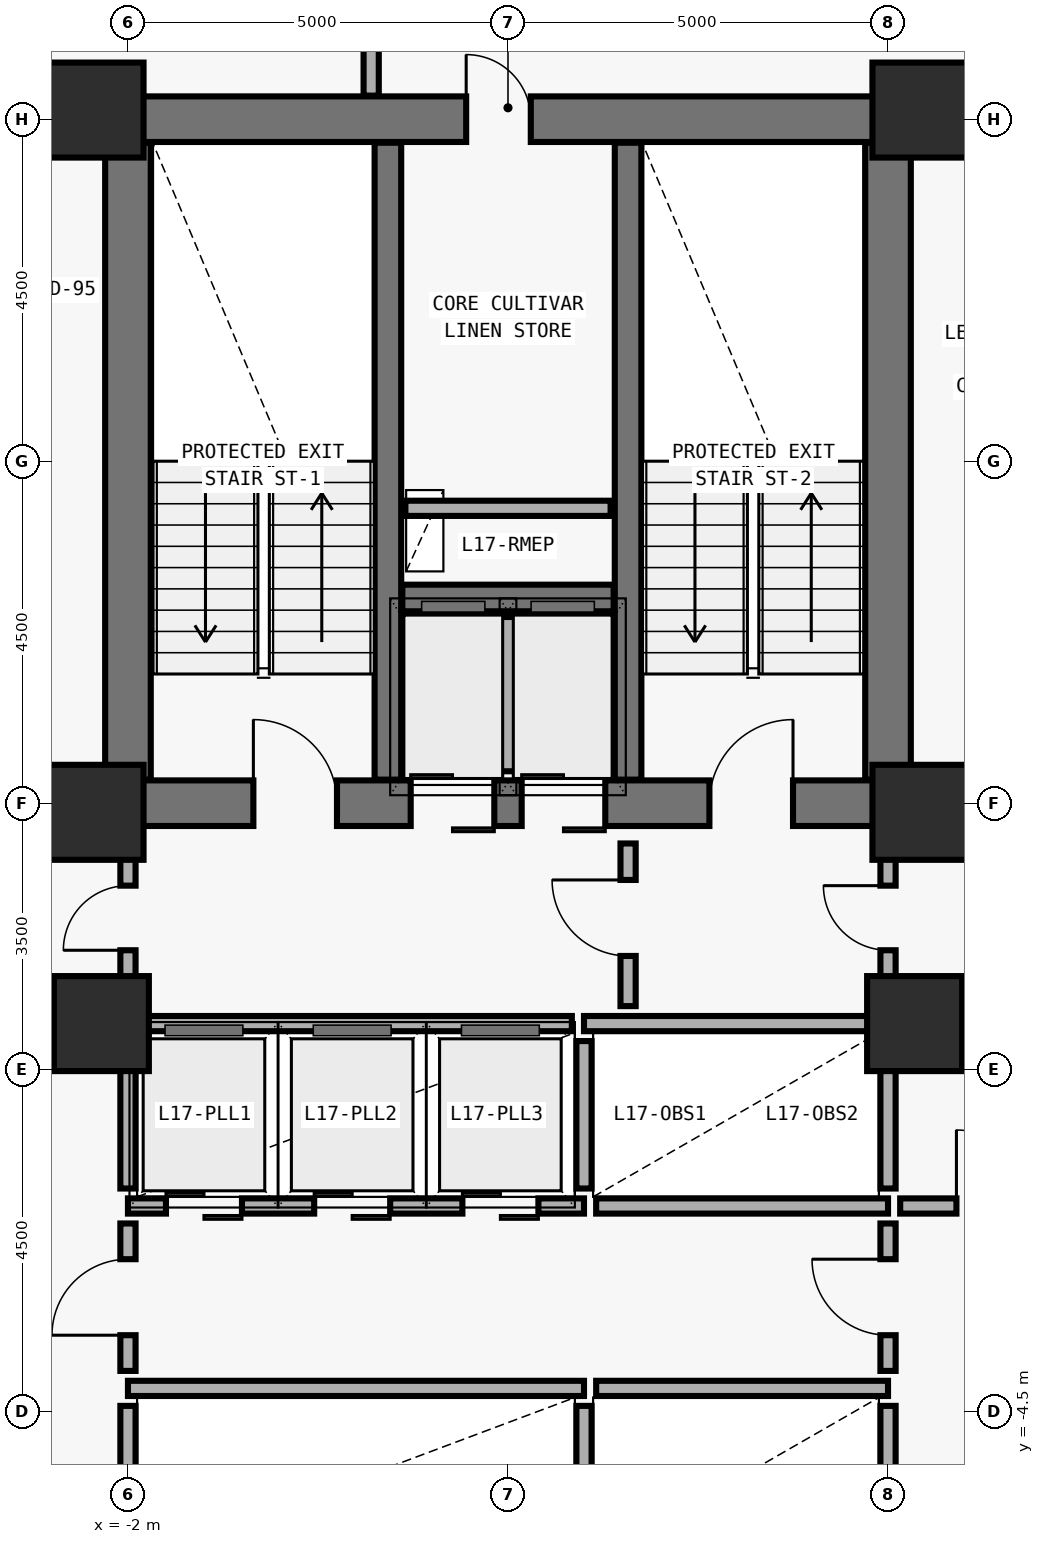
"""IFC4 building model, lengths in metres.
Left out: names, types, materials, properties, quantities, classifications, styles, units other than length and angle.
Written with IfcOpenShell. Run it as: python <this file> out.ifc"""

import sys

from ifc_helpers import new_model, si_unit, direction, frame, frame_2d, origin, origin_2d, place, context, subcontext, project, spatial, rectangle, extrude, element, fill, save


model = new_model("IFC4")
c1 = context("Model", 3, precision=1e-05, world=origin(), true_north=direction((0.0, 1.0)))
c2 = subcontext(c1, "Body", "Model", "MODEL_VIEW")
j1 = project(units=[si_unit("LENGTHUNIT", "METRE"), si_unit("PLANEANGLEUNIT", "RADIAN")], contexts=[c1])
p1 = place(None, origin())
s1 = spatial("IfcSite", under=j1, at=p1, CompositionType="ELEMENT")
p2 = place(p1, origin())
s2 = spatial("IfcBuilding", under=s1, at=p2, CompositionType="ELEMENT")
p3 = place(p2, frame((0.0, 0.0, 70.5)))
s3 = spatial("IfcBuildingStorey", under=s2, at=p3, CompositionType="ELEMENT", Elevation=70.5)
p4 = place(p3, frame((-2.0, 3.5, 0.0), z_axis=(0.0, 0.0, 1.0), x_axis=(1.0, 0.0, 0.0)))
e1 = element("IfcWall", 1, at=p4, inside=s3, PredefinedType="SHEAR", context=c2, shape_type="SweptSolid", body=[
    extrude(rectangle(XDim=10.0, YDim=0.6, at=frame_2d((5.0, 0.0))), origin(), (0.0, 0.0, 1.0), 3.892),
])
p5 = place(p4, frame((1.65, 0.0, 0.0)))
e2 = element("IfcOpeningElement", 2, at=p5, cuts=e1, PredefinedType="OPENING", context=c2, shape_type="SweptSolid", body=[
    extrude(rectangle(XDim=1.1, YDim=2.15, at=frame_2d((0.55, 1.075))), frame((0.0, 0.31, 0.0), z_axis=(0.0, -1.0, 0.0), x_axis=(1.0, 0.0, 0.0)), (0.0, 0.0, 1.0), 0.62),
])
p6 = place(p4, frame((7.65, 0.0, 0.0)))
e3 = element("IfcOpeningElement", 3, at=p6, cuts=e1, PredefinedType="OPENING", context=c2, shape_type="SweptSolid", body=[
    extrude(rectangle(XDim=1.1, YDim=2.15, at=frame_2d((0.55, 1.075))), frame((0.0, 0.31, 0.0), z_axis=(0.0, -1.0, 0.0), x_axis=(1.0, 0.0, 0.0)), (0.0, 0.0, 1.0), 0.62),
])
p7 = place(p4, frame((3.72, 0.0, 0.0)))
e4 = element("IfcOpeningElement", 4, at=p7, cuts=e1, PredefinedType="OPENING", context=c2, shape_type="SweptSolid", body=[
    extrude(rectangle(XDim=1.1, YDim=2.2, at=frame_2d((0.55, 1.1))), frame((0.0, 0.31, 0.0), z_axis=(0.0, -1.0, 0.0), x_axis=(1.0, 0.0, 0.0)), (0.0, 0.0, 1.0), 0.62),
])
p8 = place(p4, frame((5.18, 0.0, 0.0)))
e5 = element("IfcOpeningElement", 5, at=p8, cuts=e1, PredefinedType="OPENING", context=c2, shape_type="SweptSolid", body=[
    extrude(rectangle(XDim=1.1, YDim=2.2, at=frame_2d((0.55, 1.1))), frame((0.0, 0.31, 0.0), z_axis=(0.0, -1.0, 0.0), x_axis=(1.0, 0.0, 0.0)), (0.0, 0.0, 1.0), 0.62),
])
p9 = place(p3, frame((-2.0, 12.5, 0.0), z_axis=(0.0, 0.0, 1.0), x_axis=(1.0, 0.0, 0.0)))
e6 = element("IfcWall", 6, at=p9, inside=s3, PredefinedType="SHEAR", context=c2, shape_type="SweptSolid", body=[
    extrude(rectangle(XDim=10.0, YDim=0.6, at=frame_2d((5.0, 0.0))), origin(), (0.0, 0.0, 1.0), 3.892),
])
p10 = place(p9, frame((4.45, 0.0, 0.0)))
e7 = element("IfcOpeningElement", 7, at=p10, cuts=e6, PredefinedType="OPENING", context=c2, shape_type="SweptSolid", body=[
    extrude(rectangle(XDim=0.85, YDim=2.1, at=frame_2d((0.425, 1.05))), frame((0.0, 0.31, 0.0), z_axis=(0.0, -1.0, 0.0), x_axis=(1.0, 0.0, 0.0)), (0.0, 0.0, 1.0), 0.62),
])
for number, where, z_axis, x_axis in (
    (8, (-2.0, 3.81, 0.0), (0.0, 0.0, 1.0), (0.0, 1.0, 0.0)),
    (9, (8.0, 3.81, 0.0), (0.0, 0.0, 1.0), (0.0, 1.0, 0.0)),
):
    element("IfcWall", number, at=place(p3, frame(where, z_axis=z_axis, x_axis=x_axis)), inside=s3, PredefinedType="SHEAR", context=c2, shape_type="SweptSolid", body=[
        extrude(rectangle(XDim=8.38, YDim=0.6, at=frame_2d((4.19, 0.0))), origin(), (0.0, 0.0, 1.0), 3.892),
    ])
for number, where, z_axis, x_axis in (
    (10, (1.42, 3.81, 0.0), (0.0, 0.0, 1.0), (0.0, 1.0, 0.0)),
    (11, (4.58, 3.81, 0.0), (0.0, 0.0, 1.0), (0.0, 1.0, 0.0)),
):
    element("IfcWall", number, at=place(p3, frame(where, z_axis=z_axis, x_axis=x_axis)), inside=s3, PredefinedType="SHEAR", context=c2, shape_type="SweptSolid", body=[
        extrude(rectangle(XDim=8.38, YDim=0.35, at=frame_2d((4.19, 0.0))), origin(), (0.0, 0.0, 1.0), 3.892),
    ])
p11 = place(p3, frame((1.61, 6.2, 0.0), z_axis=(0.0, 0.0, 1.0), x_axis=(1.0, 0.0, 0.0)))
e12 = element("IfcWall", 12, at=p11, inside=s3, PredefinedType="SHEAR", context=c2, shape_type="SweptSolid", body=[
    extrude(rectangle(XDim=2.78, YDim=0.35, at=frame_2d((1.39, 0.0))), origin(), (0.0, 0.0, 1.0), 3.892),
])
for number, where, z_axis, x_axis in (
    (13, (-2.42, 12.62, 0.0), (0.0, 0.0, 1.0), (1.0, 0.0, 0.0)),
    (14, (8.42, 12.62, 0.0), (0.0, 0.0, 1.0), (1.0, 0.0, 0.0)),
    (15, (-2.42, 3.38, 0.0), (0.0, 0.0, 1.0), (1.0, 0.0, 0.0)),
    (16, (8.42, 3.38, 0.0), (0.0, 0.0, 1.0), (1.0, 0.0, 0.0)),
    (17, (-2.35, 0.6, 0.0), (0.0, 0.0, 1.0), (1.0, 0.0, 0.0)),
    (18, (8.35, 0.6, 0.0), (0.0, 0.0, 1.0), (1.0, 0.0, 0.0)),
):
    element("IfcColumn", number, at=place(p3, frame(where, z_axis=z_axis, x_axis=x_axis)), inside=s3, PredefinedType="COLUMN", context=c2, shape_type="SweptSolid", body=[
        extrude(rectangle(XDim=1.25, YDim=1.25, at=origin_2d()), origin(), (0.0, 0.0, 1.0), 3.875),
    ])
p12 = place(p3, frame((3.0, 3.92, 0.0), z_axis=(0.0, 0.0, 1.0), x_axis=(0.0, 1.0, 0.0)))
e19 = element("IfcWall", 19, at=p12, inside=s3, PredefinedType="SOLIDWALL", context=c2, shape_type="SweptSolid", body=[
    extrude(rectangle(XDim=2.03, YDim=0.2, at=frame_2d((1.015, 0.0))), origin(), (0.0, 0.0, 1.0), 3.64),
])
p13 = place(p3, frame((1.65, 7.38, 0.0), z_axis=(0.0, 0.0, 1.0), x_axis=(1.0, 0.0, 0.0)))
e20 = element("IfcWall", 20, at=p13, inside=s3, PredefinedType="SOLIDWALL", context=c2, shape_type="SweptSolid", body=[
    extrude(rectangle(XDim=2.7, YDim=0.2, at=frame_2d((1.35, 0.0))), origin(), (0.0, 0.0, 1.0), 3.64),
])
p14 = place(p3, frame((4.0, 0.6, 0.0), z_axis=(0.0, 0.0, 1.0), x_axis=(1.0, 0.0, 0.0)))
e21 = element("IfcWall", 21, at=p14, inside=s3, PredefinedType="SOLIDWALL", context=c2, shape_type="SweptSolid", body=[
    extrude(rectangle(XDim=3.88, YDim=0.2, at=frame_2d((1.94, 0.0))), origin(), (0.0, 0.0, 1.0), 3.122),
])
p15 = place(p3, frame((-2.0, -1.8, 0.0), z_axis=(0.0, 0.0, 1.0), x_axis=(1.0, 0.0, 0.0)))
e22 = element("IfcWall", 22, at=p15, inside=s3, PredefinedType="SOLIDWALL", context=c2, shape_type="SweptSolid", body=[
    extrude(rectangle(XDim=6.0, YDim=0.2, at=frame_2d((3.0, 0.0))), origin(), (0.0, 0.0, 1.0), 3.64),
])
p16 = place(p15, frame((0.5, 0.0, 0.0)))
e23 = element("IfcOpeningElement", 23, at=p16, cuts=e22, PredefinedType="OPENING", context=c2, shape_type="SweptSolid", body=[
    extrude(rectangle(XDim=1.0, YDim=2.2, at=frame_2d((0.5, 1.1))), frame((0.0, 0.11, 0.0), z_axis=(0.0, -1.0, 0.0), x_axis=(1.0, 0.0, 0.0)), (0.0, 0.0, 1.0), 0.22),
])
p17 = place(p15, frame((2.45, 0.0, 0.0)))
e24 = element("IfcOpeningElement", 24, at=p17, cuts=e22, PredefinedType="OPENING", context=c2, shape_type="SweptSolid", body=[
    extrude(rectangle(XDim=1.0, YDim=2.2, at=frame_2d((0.5, 1.1))), frame((0.0, 0.11, 0.0), z_axis=(0.0, -1.0, 0.0), x_axis=(1.0, 0.0, 0.0)), (0.0, 0.0, 1.0), 0.22),
])
p18 = place(p15, frame((4.4, 0.0, 0.0)))
e25 = element("IfcOpeningElement", 25, at=p18, cuts=e22, PredefinedType="OPENING", context=c2, shape_type="SweptSolid", body=[
    extrude(rectangle(XDim=1.0, YDim=2.2, at=frame_2d((0.5, 1.1))), frame((0.0, 0.11, 0.0), z_axis=(0.0, -1.0, 0.0), x_axis=(1.0, 0.0, 0.0)), (0.0, 0.0, 1.0), 0.22),
])
p19 = place(p3, frame((-2.0, -1.57, 0.0), z_axis=(0.0, 0.0, 1.0), x_axis=(0.0, 1.0, 0.0)))
e26 = element("IfcWall", 26, at=p19, inside=s3, PredefinedType="SOLIDWALL", context=c2, shape_type="SweptSolid", body=[
    extrude(rectangle(XDim=2.05, YDim=0.2, at=frame_2d((1.025, 0.0))), origin(), (0.0, 0.0, 1.0), 3.022),
])
p20 = place(p3, frame((4.16, -1.8, 0.0), z_axis=(0.0, 0.0, 1.0), x_axis=(1.0, 0.0, 0.0)))
e27 = element("IfcWall", 27, at=p20, inside=s3, PredefinedType="SOLIDWALL", context=c2, shape_type="SweptSolid", body=[
    extrude(rectangle(XDim=3.84, YDim=0.2, at=frame_2d((1.92, 0.0))), origin(), (0.0, 0.0, 1.0), 3.64),
])
p21 = place(p3, frame((4.0, -1.57, 0.0), z_axis=(0.0, 0.0, 1.0), x_axis=(0.0, 1.0, 0.0)))
e28 = element("IfcWall", 28, at=p21, inside=s3, PredefinedType="SOLIDWALL", context=c2, shape_type="SweptSolid", body=[
    extrude(rectangle(XDim=1.94, YDim=0.2, at=frame_2d((0.97, 0.0))), origin(), (0.0, 0.0, 1.0), 3.64),
])
p22 = place(p3, frame((8.0, -1.57, 0.0), z_axis=(0.0, 0.0, 1.0), x_axis=(0.0, 1.0, 0.0)))
e29 = element("IfcWall", 29, at=p22, inside=s3, PredefinedType="SOLIDWALL", context=c2, shape_type="SweptSolid", body=[
    extrude(rectangle(XDim=2.05, YDim=0.2, at=frame_2d((1.025, 0.0))), origin(), (0.0, 0.0, 1.0), 3.072),
])
p23 = place(p3, frame((-2.0, -4.2, 0.0), z_axis=(0.0, 0.0, 1.0), x_axis=(1.0, 0.0, 0.0)))
e30 = element("IfcWall", 30, at=p23, inside=s3, PredefinedType="SOLIDWALL", context=c2, shape_type="SweptSolid", body=[
    extrude(rectangle(XDim=6.0, YDim=0.2, at=frame_2d((3.0, 0.0))), origin(), (0.0, 0.0, 1.0), 3.64),
])
p24 = place(p3, frame((-2.0, -6.37, 0.0), z_axis=(0.0, 0.0, 1.0), x_axis=(0.0, 1.0, 0.0)))
e31 = element("IfcWall", 31, at=p24, inside=s3, PredefinedType="SOLIDWALL", context=c2, shape_type="SweptSolid", body=[
    extrude(rectangle(XDim=1.94, YDim=0.2, at=frame_2d((0.97, 0.0))), origin(), (0.0, 0.0, 1.0), 3.022),
])
p25 = place(p3, frame((4.16, -4.2, 0.0), z_axis=(0.0, 0.0, 1.0), x_axis=(1.0, 0.0, 0.0)))
e32 = element("IfcWall", 32, at=p25, inside=s3, PredefinedType="SOLIDWALL", context=c2, shape_type="SweptSolid", body=[
    extrude(rectangle(XDim=3.84, YDim=0.2, at=frame_2d((1.92, 0.0))), origin(), (0.0, 0.0, 1.0), 3.64),
])
p26 = place(p3, frame((4.0, -6.37, 0.0), z_axis=(0.0, 0.0, 1.0), x_axis=(0.0, 1.0, 0.0)))
e33 = element("IfcWall", 33, at=p26, inside=s3, PredefinedType="SOLIDWALL", context=c2, shape_type="SweptSolid", body=[
    extrude(rectangle(XDim=1.94, YDim=0.2, at=frame_2d((0.97, 0.0))), origin(), (0.0, 0.0, 1.0), 3.64),
])
p27 = place(p3, frame((8.0, -6.37, 0.0), z_axis=(0.0, 0.0, 1.0), x_axis=(0.0, 1.0, 0.0)))
e34 = element("IfcWall", 34, at=p27, inside=s3, PredefinedType="SOLIDWALL", context=c2, shape_type="SweptSolid", body=[
    extrude(rectangle(XDim=1.94, YDim=0.2, at=frame_2d((0.97, 0.0))), origin(), (0.0, 0.0, 1.0), 3.072),
])
p28 = place(p3, frame((4.58, 0.83, 0.0), z_axis=(0.0, 0.0, 1.0), x_axis=(0.0, 1.0, 0.0)))
e35 = element("IfcWall", 35, at=p28, inside=s3, PredefinedType="MOVABLE", context=c2, shape_type="SweptSolid", body=[
    extrude(rectangle(XDim=2.14, YDim=0.2, at=frame_2d((1.07, 0.0))), origin(), (0.0, 0.0, 1.0), 3.64),
])
p29 = place(p28, frame((0.66, 0.0, 0.0)))
e36 = element("IfcOpeningElement", 36, at=p29, cuts=e35, PredefinedType="OPENING", context=c2, shape_type="SweptSolid", body=[
    extrude(rectangle(XDim=1.0, YDim=2.1, at=frame_2d((0.5, 1.05))), frame((0.0, 0.11, 0.0), z_axis=(0.0, -1.0, 0.0), x_axis=(1.0, 0.0, 0.0)), (0.0, 0.0, 1.0), 0.22),
])
p30 = place(p3, frame((-2.0, 0.72, 0.0), z_axis=(0.0, 0.0, 1.0), x_axis=(0.0, 1.0, 0.0)))
e37 = element("IfcWall", 37, at=p30, inside=s3, PredefinedType="MOVABLE", context=c2, shape_type="SweptSolid", body=[
    extrude(rectangle(XDim=2.25, YDim=0.2, at=frame_2d((1.125, 0.0))), origin(), (0.0, 0.0, 1.0), 2.872),
])
p31 = place(p30, frame((0.845, 0.0, 0.0)))
e38 = element("IfcOpeningElement", 38, at=p31, cuts=e37, PredefinedType="OPENING", context=c2, shape_type="SweptSolid", body=[
    extrude(rectangle(XDim=0.85, YDim=2.1, at=frame_2d((0.425, 1.05))), frame((0.0, 0.11, 0.0), z_axis=(0.0, -1.0, 0.0), x_axis=(1.0, 0.0, 0.0)), (0.0, 0.0, 1.0), 0.22),
])
p32 = place(p3, frame((8.0, 0.72, 0.0), z_axis=(0.0, 0.0, 1.0), x_axis=(0.0, 1.0, 0.0)))
e39 = element("IfcWall", 39, at=p32, inside=s3, PredefinedType="MOVABLE", context=c2, shape_type="SweptSolid", body=[
    extrude(rectangle(XDim=2.25, YDim=0.2, at=frame_2d((1.125, 0.0))), origin(), (0.0, 0.0, 1.0), 2.872),
])
p33 = place(p32, frame((0.845, 0.0, 0.0)))
e40 = element("IfcOpeningElement", 40, at=p33, cuts=e39, PredefinedType="OPENING", context=c2, shape_type="SweptSolid", body=[
    extrude(rectangle(XDim=0.85, YDim=2.1, at=frame_2d((0.425, 1.05))), frame((0.0, 0.11, 0.0), z_axis=(0.0, -1.0, 0.0), x_axis=(1.0, 0.0, 0.0)), (0.0, 0.0, 1.0), 0.22),
])
p34 = place(p3, frame((-2.0, -3.97, 0.0), z_axis=(0.0, 0.0, 1.0), x_axis=(0.0, 1.0, 0.0)))
e41 = element("IfcWall", 41, at=p34, inside=s3, PredefinedType="MOVABLE", context=c2, shape_type="SweptSolid", body=[
    extrude(rectangle(XDim=1.94, YDim=0.2, at=frame_2d((0.97, 0.0))), origin(), (0.0, 0.0, 1.0), 3.022),
])
p35 = place(p34, frame((0.47, 0.0, 0.0)))
e42 = element("IfcOpeningElement", 42, at=p35, cuts=e41, PredefinedType="OPENING", context=c2, shape_type="SweptSolid", body=[
    extrude(rectangle(XDim=1.0, YDim=2.1, at=frame_2d((0.5, 1.05))), frame((0.0, 0.11, 0.0), z_axis=(0.0, -1.0, 0.0), x_axis=(1.0, 0.0, 0.0)), (0.0, 0.0, 1.0), 0.22),
])
p36 = place(p3, frame((8.0, -3.97, 0.0), z_axis=(0.0, 0.0, 1.0), x_axis=(0.0, 1.0, 0.0)))
e43 = element("IfcWall", 43, at=p36, inside=s3, PredefinedType="MOVABLE", context=c2, shape_type="SweptSolid", body=[
    extrude(rectangle(XDim=1.94, YDim=0.2, at=frame_2d((0.97, 0.0))), origin(), (0.0, 0.0, 1.0), 3.072),
])
p37 = place(p36, frame((0.47, 0.0, 0.0)))
e44 = element("IfcOpeningElement", 44, at=p37, cuts=e43, PredefinedType="OPENING", context=c2, shape_type="SweptSolid", body=[
    extrude(rectangle(XDim=1.0, YDim=2.1, at=frame_2d((0.5, 1.05))), frame((0.0, 0.11, 0.0), z_axis=(0.0, -1.0, 0.0), x_axis=(1.0, 0.0, 0.0)), (0.0, 0.0, 1.0), 0.22),
])
p38 = place(p3, frame((8.16, -1.8, 0.0), z_axis=(0.0, 0.0, 1.0), x_axis=(1.0, 0.0, 0.0)))
e45 = element("IfcWall", 45, at=p38, inside=s3, PredefinedType="MOVABLE", context=c2, shape_type="SweptSolid", body=[
    extrude(rectangle(XDim=2.64, YDim=0.2, at=frame_2d((1.32, 0.0))), origin(), (0.0, 0.0, 1.0), 3.64),
])
p39 = place(p38, frame((0.74, 0.0, 0.0)))
e46 = element("IfcOpeningElement", 46, at=p39, cuts=e45, PredefinedType="OPENING", context=c2, shape_type="SweptSolid", body=[
    extrude(rectangle(XDim=1.0, YDim=2.1, at=frame_2d((0.5, 1.05))), frame((0.0, 0.11, 0.0), z_axis=(0.0, -1.0, 0.0), x_axis=(1.0, 0.0, 0.0)), (0.0, 0.0, 1.0), 0.22),
])
p40 = place(p3, frame((-1.88, 0.6, 0.0), z_axis=(0.0, 0.0, 1.0), x_axis=(1.0, 0.0, 0.0)))
e47 = element("IfcWall", 47, at=p40, inside=s3, PredefinedType="MOVABLE", context=c2, shape_type="SweptSolid", body=[
    extrude(rectangle(XDim=5.72, YDim=0.2, at=frame_2d((2.86, 0.0))), origin(), (0.0, 0.0, 1.0), 3.122),
])
p41 = place(p3, frame((1.2, 14.7, 0.0), z_axis=(0.0, 0.0, 1.0), x_axis=(0.0, -1.0, 0.0)))
e48 = element("IfcWall", 48, at=p41, inside=s3, PredefinedType="MOVABLE", context=c2, shape_type="SweptSolid", body=[
    extrude(rectangle(XDim=1.89, YDim=0.2, at=frame_2d((0.945, 0.0))), origin(), (0.0, 0.0, 1.0), 3.64),
])
p42 = place(p5, origin())
e49 = element("IfcDoor", 49, at=p42, inside=s3, OperationType="SINGLE_SWING_LEFT", PredefinedType="DOOR", context=c2, shape_type="SweptSolid", body=[
    extrude(rectangle(XDim=1.1, YDim=2.15, at=frame_2d((0.55, 1.075))), frame((0.0, 0.025, 0.0), z_axis=(0.0, -1.0, 0.0), x_axis=(1.0, 0.0, 0.0)), (0.0, 0.0, 1.0), 0.05),
])
fill(e2, e49)
p43 = place(p6, origin())
e50 = element("IfcDoor", 50, at=p43, inside=s3, OperationType="SINGLE_SWING_RIGHT", PredefinedType="DOOR", context=c2, shape_type="SweptSolid", body=[
    extrude(rectangle(XDim=1.1, YDim=2.15, at=frame_2d((0.55, 1.075))), frame((0.0, 0.025, 0.0), z_axis=(0.0, -1.0, 0.0), x_axis=(1.0, 0.0, 0.0)), (0.0, 0.0, 1.0), 0.05),
])
fill(e3, e50)
p44 = place(p7, origin())
e51 = element("IfcDoor", 51, at=p44, inside=s3, OperationType="DOUBLE_DOOR_SLIDING", PredefinedType="DOOR", context=c2, shape_type="SweptSolid", body=[
    extrude(rectangle(XDim=1.1, YDim=2.2, at=frame_2d((0.55, 1.1))), frame((0.0, 0.025, 0.0), z_axis=(0.0, -1.0, 0.0), x_axis=(1.0, 0.0, 0.0)), (0.0, 0.0, 1.0), 0.05),
])
fill(e4, e51)
p45 = place(p8, origin())
e52 = element("IfcDoor", 52, at=p45, inside=s3, OperationType="DOUBLE_DOOR_SLIDING", PredefinedType="DOOR", context=c2, shape_type="SweptSolid", body=[
    extrude(rectangle(XDim=1.1, YDim=2.2, at=frame_2d((0.55, 1.1))), frame((0.0, 0.025, 0.0), z_axis=(0.0, -1.0, 0.0), x_axis=(1.0, 0.0, 0.0)), (0.0, 0.0, 1.0), 0.05),
])
fill(e5, e52)
p46 = place(p10, origin())
e53 = element("IfcDoor", 53, at=p46, inside=s3, OperationType="SINGLE_SWING_LEFT", PredefinedType="DOOR", context=c2, shape_type="SweptSolid", body=[
    extrude(rectangle(XDim=0.85, YDim=2.1, at=frame_2d((0.425, 1.05))), frame((0.0, 0.025, 0.0), z_axis=(0.0, -1.0, 0.0), x_axis=(1.0, 0.0, 0.0)), (0.0, 0.0, 1.0), 0.05),
])
fill(e7, e53)
p47 = place(p29, origin())
e54 = element("IfcDoor", 54, at=p47, inside=s3, OperationType="SINGLE_SWING_RIGHT", PredefinedType="DOOR", context=c2, shape_type="SweptSolid", body=[
    extrude(rectangle(XDim=1.0, YDim=2.1, at=frame_2d((0.5, 1.05))), frame((0.0, 0.025, 0.0), z_axis=(0.0, -1.0, 0.0), x_axis=(1.0, 0.0, 0.0)), (0.0, 0.0, 1.0), 0.05),
])
fill(e36, e54)
p48 = place(p31, origin())
e55 = element("IfcDoor", 55, at=p48, inside=s3, OperationType="SINGLE_SWING_LEFT", PredefinedType="DOOR", context=c2, shape_type="SweptSolid", body=[
    extrude(rectangle(XDim=0.85, YDim=2.1, at=frame_2d((0.425, 1.05))), frame((0.0, 0.025, 0.0), z_axis=(0.0, -1.0, 0.0), x_axis=(1.0, 0.0, 0.0)), (0.0, 0.0, 1.0), 0.05),
])
fill(e38, e55)
p49 = place(p33, origin())
e56 = element("IfcDoor", 56, at=p49, inside=s3, OperationType="SINGLE_SWING_RIGHT", PredefinedType="DOOR", context=c2, shape_type="SweptSolid", body=[
    extrude(rectangle(XDim=0.85, YDim=2.1, at=frame_2d((0.425, 1.05))), frame((0.0, 0.025, 0.0), z_axis=(0.0, -1.0, 0.0), x_axis=(1.0, 0.0, 0.0)), (0.0, 0.0, 1.0), 0.05),
])
fill(e40, e56)
p50 = place(p35, origin())
e57 = element("IfcDoor", 57, at=p50, inside=s3, OperationType="SINGLE_SWING_LEFT", PredefinedType="DOOR", context=c2, shape_type="SweptSolid", body=[
    extrude(rectangle(XDim=1.0, YDim=2.1, at=frame_2d((0.5, 1.05))), frame((0.0, 0.025, 0.0), z_axis=(0.0, -1.0, 0.0), x_axis=(1.0, 0.0, 0.0)), (0.0, 0.0, 1.0), 0.05),
])
fill(e42, e57)
p51 = place(p37, origin())
e58 = element("IfcDoor", 58, at=p51, inside=s3, OperationType="SINGLE_SWING_RIGHT", PredefinedType="DOOR", context=c2, shape_type="SweptSolid", body=[
    extrude(rectangle(XDim=1.0, YDim=2.1, at=frame_2d((0.5, 1.05))), frame((0.0, 0.025, 0.0), z_axis=(0.0, -1.0, 0.0), x_axis=(1.0, 0.0, 0.0)), (0.0, 0.0, 1.0), 0.05),
])
fill(e44, e58)
p52 = place(p39, origin())
e59 = element("IfcDoor", 59, at=p52, inside=s3, OperationType="SINGLE_SWING_LEFT", PredefinedType="DOOR", context=c2, shape_type="SweptSolid", body=[
    extrude(rectangle(XDim=1.0, YDim=2.1, at=frame_2d((0.5, 1.05))), frame((0.0, 0.025, 0.0), z_axis=(0.0, -1.0, 0.0), x_axis=(1.0, 0.0, 0.0)), (0.0, 0.0, 1.0), 0.05),
])
fill(e46, e59)
p53 = place(p16, origin())
e60 = element("IfcDoor", 60, at=p53, inside=s3, OperationType="DOUBLE_DOOR_SLIDING", PredefinedType="DOOR", context=c2, shape_type="SweptSolid", body=[
    extrude(rectangle(XDim=1.0, YDim=2.2, at=frame_2d((0.5, 1.1))), frame((0.0, 0.025, 0.0), z_axis=(0.0, -1.0, 0.0), x_axis=(1.0, 0.0, 0.0)), (0.0, 0.0, 1.0), 0.05),
])
fill(e23, e60)
p54 = place(p17, origin())
e61 = element("IfcDoor", 61, at=p54, inside=s3, OperationType="DOUBLE_DOOR_SLIDING", PredefinedType="DOOR", context=c2, shape_type="SweptSolid", body=[
    extrude(rectangle(XDim=1.0, YDim=2.2, at=frame_2d((0.5, 1.1))), frame((0.0, 0.025, 0.0), z_axis=(0.0, -1.0, 0.0), x_axis=(1.0, 0.0, 0.0)), (0.0, 0.0, 1.0), 0.05),
])
fill(e24, e61)
p55 = place(p18, origin())
e62 = element("IfcDoor", 62, at=p55, inside=s3, OperationType="DOUBLE_DOOR_SLIDING", PredefinedType="DOOR", context=c2, shape_type="SweptSolid", body=[
    extrude(rectangle(XDim=1.0, YDim=2.2, at=frame_2d((0.5, 1.1))), frame((0.0, 0.025, 0.0), z_axis=(0.0, -1.0, 0.0), x_axis=(1.0, 0.0, 0.0)), (0.0, 0.0, 1.0), 0.05),
])
fill(e25, e62)
save(model, sys.argv[1])
